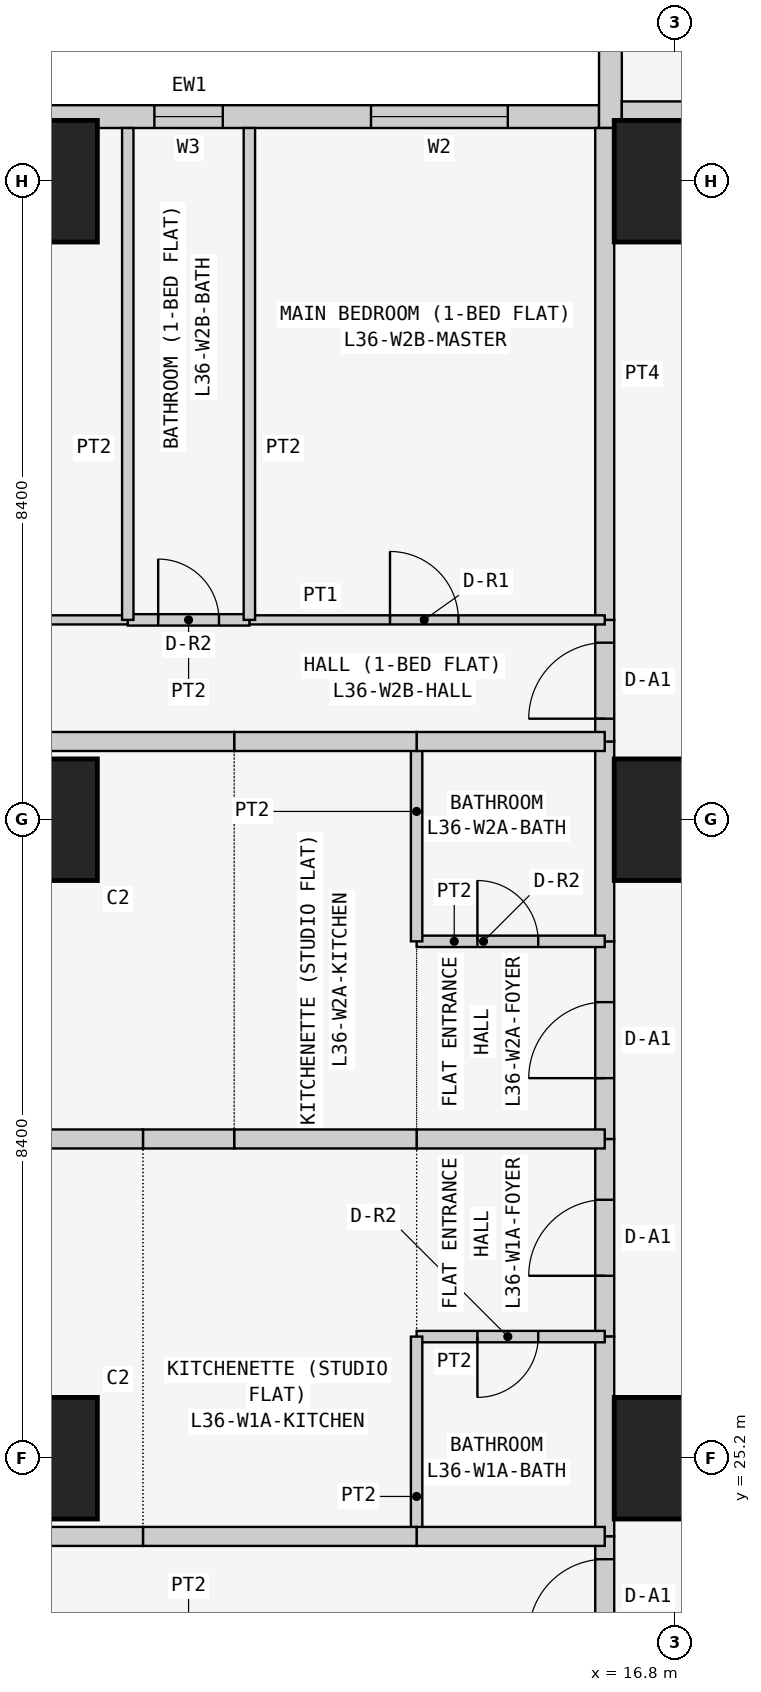
"""IFC4 building model, lengths in metres.
Left out: names, types, materials, properties, quantities, classifications, styles, units other than length and angle.
Written with IfcOpenShell. Run it as: python <this file> out.ifc"""

import sys

from ifc_helpers import new_model, si_unit, direction, frame, frame_2d, origin, origin_2d, place, context, subcontext, project, spatial, rectangle, extrude, element, fill, save


model = new_model("IFC4")
c1 = context("Model", 3, precision=1e-05, world=origin(), true_north=direction((0.0, 1.0)))
c2 = subcontext(c1, "Body", "Model", "MODEL_VIEW")
j1 = project(units=[si_unit("LENGTHUNIT", "METRE"), si_unit("PLANEANGLEUNIT", "RADIAN")], contexts=[c1])
p1 = place(None, origin())
s1 = spatial("IfcSite", under=j1, at=p1, CompositionType="ELEMENT")
p2 = place(p1, origin())
s2 = spatial("IfcBuilding", under=s1, at=p2, CompositionType="ELEMENT")
p3 = place(p2, frame((0.0, 0.0, 141.3)))
s3 = spatial("IfcBuildingStorey", under=s2, at=p3, CompositionType="ELEMENT", Elevation=141.3)
for number, where, z_axis, x_axis in (
    (1, (8.4, 25.2, 0.0), (0.0, 0.0, 1.0), (1.0, 0.0, 0.0)),
    (2, (8.4, 33.6, 0.0), (0.0, 0.0, 1.0), (1.0, 0.0, 0.0)),
    (3, (8.4, 42.0, 0.0), (0.0, 0.0, 1.0), (1.0, 0.0, 0.0)),
    (4, (16.8, 25.2, 0.0), (0.0, 0.0, 1.0), (1.0, 0.0, 0.0)),
    (5, (16.8, 33.6, 0.0), (0.0, 0.0, 1.0), (1.0, 0.0, 0.0)),
    (6, (16.8, 42.0, 0.0), (0.0, 0.0, 1.0), (1.0, 0.0, 0.0)),
):
    element("IfcColumn", number, at=place(p3, frame(where, z_axis=z_axis, x_axis=x_axis)), inside=s3, PredefinedType="COLUMN", context=c2, shape_type="SweptSolid", body=[
        extrude(rectangle(XDim=1.6, YDim=1.6, at=origin_2d()), origin(), (0.0, 0.0, 1.0), 3.6),
    ])
p4 = place(p3, frame((15.8, 42.85, 0.0), z_axis=(0.0, 0.0, 1.0), x_axis=(-1.0, 0.0, 0.0)))
e7 = element("IfcWall", 7, at=p4, inside=s3, PredefinedType="SOLIDWALL", context=c2, shape_type="SweptSolid", body=[
    extrude(rectangle(XDim=15.4, YDim=0.3, at=frame_2d((7.7, 0.0))), origin(), (0.0, 0.0, 1.0), 3.45),
])
p5 = place(p4, frame((1.2, 0.0, 0.9)))
e8 = element("IfcOpeningElement", 8, at=p5, cuts=e7, PredefinedType="OPENING", context=c2, shape_type="SweptSolid", body=[
    extrude(rectangle(XDim=1.8, YDim=1.5, at=frame_2d((0.9, 0.75))), frame((0.0, 0.16, 0.0), z_axis=(0.0, -1.0, 0.0), x_axis=(1.0, 0.0, 0.0)), (0.0, 0.0, 1.0), 0.32),
])
p6 = place(p4, frame((4.95, 0.0, 1.5)))
e9 = element("IfcOpeningElement", 9, at=p6, cuts=e7, PredefinedType="OPENING", context=c2, shape_type="SweptSolid", body=[
    extrude(rectangle(XDim=0.9, YDim=0.7, at=frame_2d((0.45, 0.35))), frame((0.0, 0.16, 0.0), z_axis=(0.0, -1.0, 0.0), x_axis=(1.0, 0.0, 0.0)), (0.0, 0.0, 1.0), 0.32),
])
p7 = place(p4, frame((8.5, 0.0, 0.9)))
e10 = element("IfcOpeningElement", 10, at=p7, cuts=e7, PredefinedType="OPENING", context=c2, shape_type="SweptSolid", body=[
    extrude(rectangle(XDim=1.8, YDim=1.5, at=frame_2d((0.9, 0.75))), frame((0.0, 0.16, 0.0), z_axis=(0.0, -1.0, 0.0), x_axis=(1.0, 0.0, 0.0)), (0.0, 0.0, 1.0), 0.32),
])
p8 = place(p4, frame((12.5, 0.0, 0.0)))
e11 = element("IfcOpeningElement", 11, at=p8, cuts=e7, PredefinedType="OPENING", context=c2, shape_type="SweptSolid", body=[
    extrude(rectangle(XDim=0.9, YDim=2.4, at=frame_2d((0.45, 1.2))), frame((0.0, 0.16, 0.0), z_axis=(0.0, -1.0, 0.0), x_axis=(1.0, 0.0, 0.0)), (0.0, 0.0, 1.0), 0.32),
])
p9 = place(p4, frame((13.5, 0.0, 0.9)))
e12 = element("IfcOpeningElement", 12, at=p9, cuts=e7, PredefinedType="OPENING", context=c2, shape_type="SweptSolid", body=[
    extrude(rectangle(XDim=1.2, YDim=1.5, at=frame_2d((0.6, 0.75))), frame((0.0, 0.16, 0.0), z_axis=(0.0, -1.0, 0.0), x_axis=(1.0, 0.0, 0.0)), (0.0, 0.0, 1.0), 0.32),
])
p10 = place(p3, frame((15.95, 50.0, 0.0), z_axis=(0.0, 0.0, 1.0), x_axis=(0.0, -1.0, 0.0)))
e13 = element("IfcWall", 13, at=p10, inside=s3, PredefinedType="SOLIDWALL", context=c2, shape_type="SweptSolid", body=[
    extrude(rectangle(XDim=7.3, YDim=0.3, at=frame_2d((3.65, 0.0))), origin(), (0.0, 0.0, 1.0), 3.45),
])
p11 = place(p10, frame((3.1, 0.0, 0.9)))
e14 = element("IfcOpeningElement", 14, at=p11, cuts=e13, PredefinedType="OPENING", context=c2, shape_type="SweptSolid", body=[
    extrude(rectangle(XDim=2.4, YDim=1.5, at=frame_2d((1.2, 0.75))), frame((0.0, 0.16, 0.0), z_axis=(0.0, -1.0, 0.0), x_axis=(1.0, 0.0, 0.0)), (0.0, 0.0, 1.0), 0.32),
])
p12 = place(p10, frame((0.75, 0.0, 0.9)))
e15 = element("IfcOpeningElement", 15, at=p12, cuts=e13, PredefinedType="OPENING", context=c2, shape_type="SweptSolid", body=[
    extrude(rectangle(XDim=1.2, YDim=1.5, at=frame_2d((0.6, 0.75))), frame((0.0, 0.16, 0.0), z_axis=(0.0, -1.0, 0.0), x_axis=(1.0, 0.0, 0.0)), (0.0, 0.0, 1.0), 0.32),
])
p13 = place(p3, frame((16.1, 42.925, 0.0), z_axis=(0.0, 0.0, 1.0), x_axis=(1.0, 0.0, 0.0)))
e16 = element("IfcWall", 16, at=p13, inside=s3, PredefinedType="PARTITIONING", context=c2, shape_type="SweptSolid", body=[
    extrude(rectangle(XDim=6.871, YDim=0.25, at=frame_2d((3.436, 0.0))), origin(), (0.0, 0.0, 1.0), 3.45),
])
p14 = place(p3, frame((15.875, 26.8, 0.0), z_axis=(0.0, 0.0, 1.0), x_axis=(0.0, 1.0, 0.0)))
e17 = element("IfcWall", 17, at=p14, inside=s3, PredefinedType="PARTITIONING", context=c2, shape_type="SweptSolid", body=[
    extrude(rectangle(XDim=2.6, YDim=0.25, at=frame_2d((1.3, 0.0))), origin(), (0.0, 0.0, 1.0), 3.45),
])
p15 = place(p14, frame((0.8, 0.0, 0.0)))
e18 = element("IfcOpeningElement", 18, at=p15, cuts=e17, PredefinedType="OPENING", context=c2, shape_type="SweptSolid", body=[
    extrude(rectangle(XDim=1.0, YDim=2.1, at=frame_2d((0.5, 1.05))), frame((0.0, 0.135, 0.0), z_axis=(0.0, -1.0, 0.0), x_axis=(1.0, 0.0, 0.0)), (0.0, 0.0, 1.0), 0.27),
])
p16 = place(p3, frame((15.875, 24.171, 0.0), z_axis=(0.0, 0.0, 1.0), x_axis=(0.0, 1.0, 0.0)))
e19 = element("IfcWall", 19, at=p16, inside=s3, PredefinedType="PARTITIONING", context=c2, shape_type="SweptSolid", body=[
    extrude(rectangle(XDim=2.629, YDim=0.25, at=frame_2d((1.314, 0.0))), origin(), (0.0, 0.0, 1.0), 3.45),
])
p17 = place(p3, frame((15.875, 22.571, 0.0), z_axis=(0.0, 0.0, 1.0), x_axis=(0.0, 1.0, 0.0)))
e20 = element("IfcWall", 20, at=p17, inside=s3, PredefinedType="PARTITIONING", context=c2, shape_type="SweptSolid", body=[
    extrude(rectangle(XDim=1.6, YDim=0.25, at=frame_2d((0.8, 0.0))), origin(), (0.0, 0.0, 1.0), 3.45),
])
p18 = place(p17, frame((0.3, 0.0, 0.0)))
e21 = element("IfcOpeningElement", 21, at=p18, cuts=e20, PredefinedType="OPENING", context=c2, shape_type="SweptSolid", body=[
    extrude(rectangle(XDim=1.0, YDim=2.1, at=frame_2d((0.5, 1.05))), frame((0.0, 0.135, 0.0), z_axis=(0.0, -1.0, 0.0), x_axis=(1.0, 0.0, 0.0)), (0.0, 0.0, 1.0), 0.27),
])
p19 = place(p3, frame((15.875, 29.4, 0.0), z_axis=(0.0, 0.0, 1.0), x_axis=(0.0, 1.0, 0.0)))
e22 = element("IfcWall", 22, at=p19, inside=s3, PredefinedType="PARTITIONING", context=c2, shape_type="SweptSolid", body=[
    extrude(rectangle(XDim=2.6, YDim=0.25, at=frame_2d((1.3, 0.0))), origin(), (0.0, 0.0, 1.0), 3.45),
])
p20 = place(p19, frame((0.8, 0.0, 0.0)))
e23 = element("IfcOpeningElement", 23, at=p20, cuts=e22, PredefinedType="OPENING", context=c2, shape_type="SweptSolid", body=[
    extrude(rectangle(XDim=1.0, YDim=2.1, at=frame_2d((0.5, 1.05))), frame((0.0, 0.135, 0.0), z_axis=(0.0, -1.0, 0.0), x_axis=(1.0, 0.0, 0.0)), (0.0, 0.0, 1.0), 0.27),
])
p21 = place(p3, frame((15.875, 32.0, 0.0), z_axis=(0.0, 0.0, 1.0), x_axis=(0.0, 1.0, 0.0)))
e24 = element("IfcWall", 24, at=p21, inside=s3, PredefinedType="PARTITIONING", context=c2, shape_type="SweptSolid", body=[
    extrude(rectangle(XDim=2.629, YDim=0.25, at=frame_2d((1.314, 0.0))), origin(), (0.0, 0.0, 1.0), 3.45),
])
p22 = place(p3, frame((15.875, 34.629, 0.0), z_axis=(0.0, 0.0, 1.0), x_axis=(0.0, 1.0, 0.0)))
e25 = element("IfcWall", 25, at=p22, inside=s3, PredefinedType="PARTITIONING", context=c2, shape_type="SweptSolid", body=[
    extrude(rectangle(XDim=1.6, YDim=0.25, at=frame_2d((0.8, 0.0))), origin(), (0.0, 0.0, 1.0), 3.45),
])
p23 = place(p22, frame((0.3, 0.0, 0.0)))
e26 = element("IfcOpeningElement", 26, at=p23, cuts=e25, PredefinedType="OPENING", context=c2, shape_type="SweptSolid", body=[
    extrude(rectangle(XDim=1.0, YDim=2.1, at=frame_2d((0.5, 1.05))), frame((0.0, 0.135, 0.0), z_axis=(0.0, -1.0, 0.0), x_axis=(1.0, 0.0, 0.0)), (0.0, 0.0, 1.0), 0.27),
])
p24 = place(p3, frame((15.875, 36.229, 0.0), z_axis=(0.0, 0.0, 1.0), x_axis=(0.0, 1.0, 0.0)))
e27 = element("IfcWall", 27, at=p24, inside=s3, PredefinedType="PARTITIONING", context=c2, shape_type="SweptSolid", body=[
    extrude(rectangle(XDim=6.471, YDim=0.25, at=frame_2d((3.235, 0.0))), origin(), (0.0, 0.0, 1.0), 3.45),
])
p25 = place(p3, frame((13.4, 26.8, 0.0), z_axis=(0.0, 0.0, 1.0), x_axis=(1.0, 0.0, 0.0)))
e28 = element("IfcWall", 28, at=p25, inside=s3, PredefinedType="PARTITIONING", context=c2, shape_type="SweptSolid", body=[
    extrude(rectangle(XDim=2.475, YDim=0.15, at=frame_2d((1.238, 0.0))), origin(), (0.0, 0.0, 1.0), 3.45),
])
p26 = place(p25, frame((0.8, 0.0, 0.0)))
e29 = element("IfcOpeningElement", 29, at=p26, cuts=e28, PredefinedType="OPENING", context=c2, shape_type="SweptSolid", body=[
    extrude(rectangle(XDim=0.8, YDim=2.1, at=frame_2d((0.4, 1.05))), frame((0.0, 0.085, 0.0), z_axis=(0.0, -1.0, 0.0), x_axis=(1.0, 0.0, 0.0)), (0.0, 0.0, 1.0), 0.17),
])
p27 = place(p3, frame((15.875, 29.4, 0.0), z_axis=(0.0, 0.0, 1.0), x_axis=(-1.0, 0.0, 0.0)))
e30 = element("IfcWall", 30, at=p27, inside=s3, PredefinedType="PARTITIONING", context=c2, shape_type="SweptSolid", body=[
    extrude(rectangle(XDim=2.475, YDim=0.25, at=frame_2d((1.238, 0.0))), origin(), (0.0, 0.0, 1.0), 3.45),
])
p28 = place(p3, frame((13.4, 26.8, 0.0), z_axis=(0.0, 0.0, 1.0), x_axis=(0.0, -1.0, 0.0)))
e31 = element("IfcWall", 31, at=p28, inside=s3, PredefinedType="PARTITIONING", context=c2, shape_type="SweptSolid", body=[
    extrude(rectangle(XDim=2.629, YDim=0.15, at=frame_2d((1.314, 0.0))), origin(), (0.0, 0.0, 1.0), 3.45),
])
p29 = place(p3, frame((13.4, 24.171, 0.0), z_axis=(0.0, 0.0, 1.0), x_axis=(1.0, 0.0, 0.0)))
e32 = element("IfcWall", 32, at=p29, inside=s3, PredefinedType="PARTITIONING", context=c2, shape_type="SweptSolid", body=[
    extrude(rectangle(XDim=2.475, YDim=0.25, at=frame_2d((1.238, 0.0))), origin(), (0.0, 0.0, 1.0), 3.45),
])
p30 = place(p3, frame((9.8, 24.171, 0.0), z_axis=(0.0, 0.0, 1.0), x_axis=(1.0, 0.0, 0.0)))
e33 = element("IfcWall", 33, at=p30, inside=s3, PredefinedType="PARTITIONING", context=c2, shape_type="SweptSolid", body=[
    extrude(rectangle(XDim=3.6, YDim=0.25, at=frame_2d((1.8, 0.0))), origin(), (0.0, 0.0, 1.0), 3.45),
])
p31 = place(p3, frame((13.4, 29.4, 0.0), z_axis=(0.0, 0.0, 1.0), x_axis=(-1.0, 0.0, 0.0)))
e34 = element("IfcWall", 34, at=p31, inside=s3, PredefinedType="PARTITIONING", context=c2, shape_type="SweptSolid", body=[
    extrude(rectangle(XDim=2.4, YDim=0.25, at=frame_2d((1.2, 0.0))), origin(), (0.0, 0.0, 1.0), 3.45),
])
p32 = place(p3, frame((11.0, 29.4, 0.0), z_axis=(0.0, 0.0, 1.0), x_axis=(-1.0, 0.0, 0.0)))
e35 = element("IfcWall", 35, at=p32, inside=s3, PredefinedType="PARTITIONING", context=c2, shape_type="SweptSolid", body=[
    extrude(rectangle(XDim=1.2, YDim=0.25, at=frame_2d((0.6, 0.0))), origin(), (0.0, 0.0, 1.0), 3.45),
])
p33 = place(p3, frame((3.5, 24.171, 0.0), z_axis=(0.0, 0.0, 1.0), x_axis=(1.0, 0.0, 0.0)))
e36 = element("IfcWall", 36, at=p33, inside=s3, PredefinedType="PARTITIONING", context=c2, shape_type="SweptSolid", body=[
    extrude(rectangle(XDim=6.3, YDim=0.25, at=frame_2d((3.15, 0.0))), origin(), (0.0, 0.0, 1.0), 3.45),
])
p34 = place(p3, frame((9.8, 29.4, 0.0), z_axis=(0.0, 0.0, 1.0), x_axis=(-1.0, 0.0, 0.0)))
e37 = element("IfcWall", 37, at=p34, inside=s3, PredefinedType="PARTITIONING", context=c2, shape_type="SweptSolid", body=[
    extrude(rectangle(XDim=10.45, YDim=0.25, at=frame_2d((5.225, 0.0))), origin(), (0.0, 0.0, 1.0), 3.45),
])
p35 = place(p3, frame((13.4, 32.0, 0.0), z_axis=(0.0, 0.0, 1.0), x_axis=(1.0, 0.0, 0.0)))
e38 = element("IfcWall", 38, at=p35, inside=s3, PredefinedType="PARTITIONING", context=c2, shape_type="SweptSolid", body=[
    extrude(rectangle(XDim=2.475, YDim=0.15, at=frame_2d((1.238, 0.0))), origin(), (0.0, 0.0, 1.0), 3.45),
])
p36 = place(p35, frame((0.8, 0.0, 0.0)))
e39 = element("IfcOpeningElement", 39, at=p36, cuts=e38, PredefinedType="OPENING", context=c2, shape_type="SweptSolid", body=[
    extrude(rectangle(XDim=0.8, YDim=2.1, at=frame_2d((0.4, 1.05))), frame((0.0, 0.085, 0.0), z_axis=(0.0, -1.0, 0.0), x_axis=(1.0, 0.0, 0.0)), (0.0, 0.0, 1.0), 0.17),
])
p37 = place(p3, frame((13.4, 32.0, 0.0), z_axis=(0.0, 0.0, 1.0), x_axis=(0.0, 1.0, 0.0)))
e40 = element("IfcWall", 40, at=p37, inside=s3, PredefinedType="PARTITIONING", context=c2, shape_type="SweptSolid", body=[
    extrude(rectangle(XDim=2.629, YDim=0.15, at=frame_2d((1.314, 0.0))), origin(), (0.0, 0.0, 1.0), 3.45),
])
p38 = place(p3, frame((13.4, 34.629, 0.0), z_axis=(0.0, 0.0, 1.0), x_axis=(1.0, 0.0, 0.0)))
e41 = element("IfcWall", 41, at=p38, inside=s3, PredefinedType="PARTITIONING", context=c2, shape_type="SweptSolid", body=[
    extrude(rectangle(XDim=2.475, YDim=0.25, at=frame_2d((1.238, 0.0))), origin(), (0.0, 0.0, 1.0), 3.45),
])
p39 = place(p3, frame((11.0, 34.629, 0.0), z_axis=(0.0, 0.0, 1.0), x_axis=(1.0, 0.0, 0.0)))
e42 = element("IfcWall", 42, at=p39, inside=s3, PredefinedType="PARTITIONING", context=c2, shape_type="SweptSolid", body=[
    extrude(rectangle(XDim=2.4, YDim=0.25, at=frame_2d((1.2, 0.0))), origin(), (0.0, 0.0, 1.0), 3.45),
])
p40 = place(p3, frame((3.5, 34.629, 0.0), z_axis=(0.0, 0.0, 1.0), x_axis=(1.0, 0.0, 0.0)))
e43 = element("IfcWall", 43, at=p40, inside=s3, PredefinedType="PARTITIONING", context=c2, shape_type="SweptSolid", body=[
    extrude(rectangle(XDim=7.5, YDim=0.25, at=frame_2d((3.75, 0.0))), origin(), (0.0, 0.0, 1.0), 3.45),
])
p41 = place(p3, frame((11.2, 36.229, 0.0), z_axis=(0.0, 0.0, 1.0), x_axis=(1.0, 0.0, 0.0)))
e44 = element("IfcWall", 44, at=p41, inside=s3, PredefinedType="PARTITIONING", context=c2, shape_type="SweptSolid", body=[
    extrude(rectangle(XDim=4.675, YDim=0.12, at=frame_2d((2.337, 0.0))), origin(), (0.0, 0.0, 1.0), 3.45),
])
p42 = place(p41, frame((1.85, 0.0, 0.0)))
e45 = element("IfcOpeningElement", 45, at=p42, cuts=e44, PredefinedType="OPENING", context=c2, shape_type="SweptSolid", body=[
    extrude(rectangle(XDim=0.9, YDim=2.1, at=frame_2d((0.45, 1.05))), frame((0.0, 0.07, 0.0), z_axis=(0.0, -1.0, 0.0), x_axis=(1.0, 0.0, 0.0)), (0.0, 0.0, 1.0), 0.14),
])
p43 = place(p3, frame((9.6, 36.229, 0.0), z_axis=(0.0, 0.0, 1.0), x_axis=(1.0, 0.0, 0.0)))
e46 = element("IfcWall", 46, at=p43, inside=s3, PredefinedType="PARTITIONING", context=c2, shape_type="SweptSolid", body=[
    extrude(rectangle(XDim=1.6, YDim=0.15, at=frame_2d((0.8, 0.0))), origin(), (0.0, 0.0, 1.0), 3.45),
])
p44 = place(p43, frame((0.4, 0.0, 0.0)))
e47 = element("IfcOpeningElement", 47, at=p44, cuts=e46, PredefinedType="OPENING", context=c2, shape_type="SweptSolid", body=[
    extrude(rectangle(XDim=0.8, YDim=2.1, at=frame_2d((0.4, 1.05))), frame((0.0, 0.085, 0.0), z_axis=(0.0, -1.0, 0.0), x_axis=(1.0, 0.0, 0.0)), (0.0, 0.0, 1.0), 0.17),
])
p45 = place(p3, frame((5.2, 36.229, 0.0), z_axis=(0.0, 0.0, 1.0), x_axis=(1.0, 0.0, 0.0)))
e48 = element("IfcWall", 48, at=p45, inside=s3, PredefinedType="PARTITIONING", context=c2, shape_type="SweptSolid", body=[
    extrude(rectangle(XDim=4.4, YDim=0.12, at=frame_2d((2.2, 0.0))), origin(), (0.0, 0.0, 1.0), 3.45),
])
p46 = place(p45, frame((1.55, 0.0, 0.0)))
e49 = element("IfcOpeningElement", 49, at=p46, cuts=e48, PredefinedType="OPENING", context=c2, shape_type="SweptSolid", body=[
    extrude(rectangle(XDim=0.9, YDim=2.1, at=frame_2d((0.45, 1.05))), frame((0.0, 0.07, 0.0), z_axis=(0.0, -1.0, 0.0), x_axis=(1.0, 0.0, 0.0)), (0.0, 0.0, 1.0), 0.14),
])
for number, where, z_axis, x_axis in (
    (50, (11.2, 36.229, 0.0), (0.0, 0.0, 1.0), (0.0, 1.0, 0.0)),
    (51, (9.6, 36.229, 0.0), (0.0, 0.0, 1.0), (0.0, 1.0, 0.0)),
):
    element("IfcWall", number, at=place(p3, frame(where, z_axis=z_axis, x_axis=x_axis)), inside=s3, PredefinedType="PARTITIONING", context=c2, shape_type="SweptSolid", body=[
        extrude(rectangle(XDim=6.471, YDim=0.15, at=frame_2d((3.235, 0.0))), origin(), (0.0, 0.0, 1.0), 3.45),
    ])
p47 = place(p5, origin())
e52 = element("IfcWindow", 52, at=p47, inside=s3, PartitioningType="SINGLE_PANEL", PredefinedType="WINDOW", context=c2, shape_type="SweptSolid", body=[
    extrude(rectangle(XDim=1.8, YDim=1.5, at=frame_2d((0.9, 0.75))), frame((0.0, 0.03, 0.0), z_axis=(0.0, -1.0, 0.0), x_axis=(1.0, 0.0, 0.0)), (0.0, 0.0, 1.0), 0.06),
])
fill(e8, e52)
p48 = place(p6, origin())
e53 = element("IfcWindow", 53, at=p48, inside=s3, PartitioningType="SINGLE_PANEL", PredefinedType="WINDOW", context=c2, shape_type="SweptSolid", body=[
    extrude(rectangle(XDim=0.9, YDim=0.7, at=frame_2d((0.45, 0.35))), frame((0.0, 0.03, 0.0), z_axis=(0.0, -1.0, 0.0), x_axis=(1.0, 0.0, 0.0)), (0.0, 0.0, 1.0), 0.06),
])
fill(e9, e53)
p49 = place(p15, origin())
e54 = element("IfcDoor", 54, at=p49, inside=s3, OperationType="SINGLE_SWING_LEFT", PredefinedType="DOOR", context=c2, shape_type="SweptSolid", body=[
    extrude(rectangle(XDim=1.0, YDim=2.1, at=frame_2d((0.5, 1.05))), frame((0.0, 0.025, 0.0), z_axis=(0.0, -1.0, 0.0), x_axis=(1.0, 0.0, 0.0)), (0.0, 0.0, 1.0), 0.05),
])
fill(e18, e54)
p50 = place(p26, frame((0.8, 0.0, 0.0), z_axis=(0.0, 0.0, 1.0), x_axis=(-1.0, 0.0, 0.0)))
e55 = element("IfcDoor", 55, at=p50, inside=s3, OperationType="SINGLE_SWING_RIGHT", PredefinedType="DOOR", context=c2, shape_type="SweptSolid", body=[
    extrude(rectangle(XDim=0.8, YDim=2.1, at=frame_2d((0.4, 1.05))), frame((0.0, 0.025, 0.0), z_axis=(0.0, -1.0, 0.0), x_axis=(1.0, 0.0, 0.0)), (0.0, 0.0, 1.0), 0.05),
])
fill(e29, e55)
p51 = place(p18, origin())
e56 = element("IfcDoor", 56, at=p51, inside=s3, OperationType="SINGLE_SWING_LEFT", PredefinedType="DOOR", context=c2, shape_type="SweptSolid", body=[
    extrude(rectangle(XDim=1.0, YDim=2.1, at=frame_2d((0.5, 1.05))), frame((0.0, 0.025, 0.0), z_axis=(0.0, -1.0, 0.0), x_axis=(1.0, 0.0, 0.0)), (0.0, 0.0, 1.0), 0.05),
])
fill(e21, e56)
p52 = place(p20, origin())
e57 = element("IfcDoor", 57, at=p52, inside=s3, OperationType="SINGLE_SWING_LEFT", PredefinedType="DOOR", context=c2, shape_type="SweptSolid", body=[
    extrude(rectangle(XDim=1.0, YDim=2.1, at=frame_2d((0.5, 1.05))), frame((0.0, 0.025, 0.0), z_axis=(0.0, -1.0, 0.0), x_axis=(1.0, 0.0, 0.0)), (0.0, 0.0, 1.0), 0.05),
])
fill(e23, e57)
p53 = place(p36, origin())
e58 = element("IfcDoor", 58, at=p53, inside=s3, OperationType="SINGLE_SWING_LEFT", PredefinedType="DOOR", context=c2, shape_type="SweptSolid", body=[
    extrude(rectangle(XDim=0.8, YDim=2.1, at=frame_2d((0.4, 1.05))), frame((0.0, 0.025, 0.0), z_axis=(0.0, -1.0, 0.0), x_axis=(1.0, 0.0, 0.0)), (0.0, 0.0, 1.0), 0.05),
])
fill(e39, e58)
p54 = place(p23, origin())
e59 = element("IfcDoor", 59, at=p54, inside=s3, OperationType="SINGLE_SWING_LEFT", PredefinedType="DOOR", context=c2, shape_type="SweptSolid", body=[
    extrude(rectangle(XDim=1.0, YDim=2.1, at=frame_2d((0.5, 1.05))), frame((0.0, 0.025, 0.0), z_axis=(0.0, -1.0, 0.0), x_axis=(1.0, 0.0, 0.0)), (0.0, 0.0, 1.0), 0.05),
])
fill(e26, e59)
p55 = place(p42, origin())
e60 = element("IfcDoor", 60, at=p55, inside=s3, OperationType="SINGLE_SWING_LEFT", PredefinedType="DOOR", context=c2, shape_type="SweptSolid", body=[
    extrude(rectangle(XDim=0.9, YDim=2.1, at=frame_2d((0.45, 1.05))), frame((0.0, 0.025, 0.0), z_axis=(0.0, -1.0, 0.0), x_axis=(1.0, 0.0, 0.0)), (0.0, 0.0, 1.0), 0.05),
])
fill(e45, e60)
p56 = place(p44, origin())
e61 = element("IfcDoor", 61, at=p56, inside=s3, OperationType="SINGLE_SWING_LEFT", PredefinedType="DOOR", context=c2, shape_type="SweptSolid", body=[
    extrude(rectangle(XDim=0.8, YDim=2.1, at=frame_2d((0.4, 1.05))), frame((0.0, 0.025, 0.0), z_axis=(0.0, -1.0, 0.0), x_axis=(1.0, 0.0, 0.0)), (0.0, 0.0, 1.0), 0.05),
])
fill(e47, e61)
save(model, sys.argv[1])
